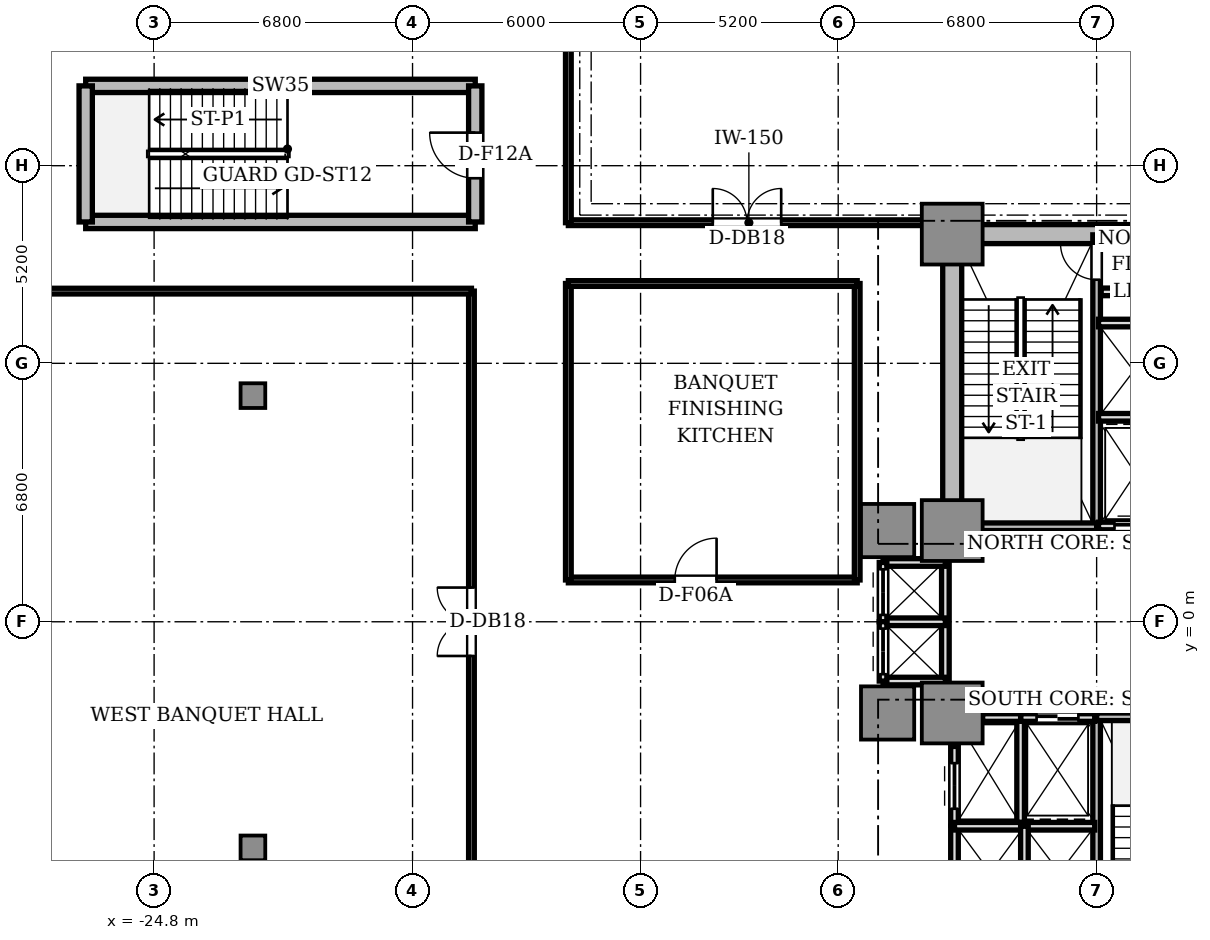
"""IFC4 building model, lengths in metres.
Left out: names, types, materials, properties, quantities, classifications, styles, units other than length and angle.
Written with IfcOpenShell. Run it as: python <this file> out.ifc"""

import sys

from ifc_helpers import new_model, si_unit, direction, frame, frame_2d, origin, origin_2d, place, context, subcontext, project, spatial, rectangle, hollow_rectangle, extrude, source, transform, mapped, element, fill, save


model = new_model("IFC4")
c1 = context("Model", 3, precision=1e-05, world=origin(), true_north=direction((0.0, 1.0)))
c2 = subcontext(c1, "Body", "Model", "MODEL_VIEW")
j1 = project(units=[si_unit("LENGTHUNIT", "METRE"), si_unit("PLANEANGLEUNIT", "RADIAN")], contexts=[c1])
p1 = place(None, origin())
s1 = spatial("IfcSite", under=j1, at=p1, CompositionType="ELEMENT")
p2 = place(p1, origin())
s2 = spatial("IfcBuilding", under=s1, at=p2, CompositionType="ELEMENT")
p3 = place(p2, frame((0.0, 0.0, 9.3)))
s3 = spatial("IfcBuildingStorey", under=s2, at=p3, CompositionType="ELEMENT", Elevation=9.3)
p4 = place(p3, frame((-3.55, 10.2, 0.0), z_axis=(0.0, 0.0, 1.0), x_axis=(1.0, 0.0, 0.0)))
e1 = element("IfcWall", 1, at=p4, inside=s3, PredefinedType="SHEAR", context=c2, shape_type="SweptSolid", body=[
    extrude(rectangle(XDim=7.1, YDim=0.5, at=frame_2d((3.55, 0.0))), origin(), (0.0, 0.0, 1.0), 4.4),
])
p5 = place(p3, frame((-3.8, 2.85, 0.0), z_axis=(0.0, 0.0, 1.0), x_axis=(0.0, 1.0, 0.0)))
e2 = element("IfcWall", 2, at=p5, inside=s3, PredefinedType="SHEAR", context=c2, shape_type="SweptSolid", body=[
    extrude(rectangle(XDim=6.9, YDim=0.5, at=frame_2d((3.45, 0.0))), origin(), (0.0, 0.0, 1.0), 4.4),
])
m1 = source(origin(), c2, "Body", "SweptSolid", [
    extrude(rectangle(XDim=1.6, YDim=1.6, at=origin_2d()), origin(), (0.0, 0.0, 1.0), 4.4),
])
for number, where, z_axis, x_axis in (
    (3, (-3.8, 2.4, 0.0), (0.0, 0.0, 1.0), (1.0, 0.0, 0.0)),
    (4, (-3.8, 10.2, 0.0), (0.0, 0.0, 1.0), (1.0, 0.0, 0.0)),
    (5, (-3.8, -2.4, 0.0), (0.0, 0.0, 1.0), (1.0, 0.0, 0.0)),
):
    element("IfcColumn", number, at=place(p3, frame(where, z_axis=z_axis, x_axis=x_axis)), inside=s3, PredefinedType="COLUMN", context=c2, shape_type="MappedRepresentation", body=[
        mapped(m1, transform((0.0, 0.0, 0.0), scale=1.0)),
    ])
m2 = source(origin(), c2, "Body", "SweptSolid", [
    extrude(rectangle(XDim=1.4, YDim=1.4, at=origin_2d()), origin(), (0.0, 0.0, 1.0), 4.4),
])
for number, where, z_axis, x_axis in (
    (6, (-5.5, 2.4, 0.0), (0.0, 0.0, 1.0), (1.0, 0.0, 0.0)),
    (7, (-5.5, -2.4, 0.0), (0.0, 0.0, 1.0), (1.0, 0.0, 0.0)),
):
    element("IfcColumn", number, at=place(p3, frame(where, z_axis=z_axis, x_axis=x_axis)), inside=s3, PredefinedType="COLUMN", context=c2, shape_type="MappedRepresentation", body=[
        mapped(m2, transform((0.0, 0.0, 0.0), scale=1.0)),
    ])
m3 = source(origin(), c2, "Body", "SweptSolid", [
    extrude(hollow_rectangle(XDim=0.65, YDim=0.65, WallThickness=0.032, at=origin_2d()), origin(), (0.0, 0.0, 1.0), 4.4),
])
for number, where, z_axis, x_axis in (
    (8, (-22.2, 5.95, 0.0), (0.0, 0.0, 1.0), (1.0, 0.0, 0.0)),
    (9, (-22.2, -5.95, 0.0), (0.0, 0.0, 1.0), (1.0, 0.0, 0.0)),
):
    element("IfcColumn", number, at=place(p3, frame(where, z_axis=z_axis, x_axis=x_axis)), inside=s3, PredefinedType="COLUMN", context=c2, shape_type="MappedRepresentation", body=[
        mapped(m3, transform((0.0, 0.0, 0.0), scale=1.0)),
    ])
p6 = place(p3, frame((0.0, 2.5, 0.0), z_axis=(0.0, 0.0, 1.0), x_axis=(0.0, 1.0, 0.0)))
e10 = element("IfcWall", 10, at=p6, inside=s3, PredefinedType="SOLIDWALL", context=c2, shape_type="SweptSolid", body=[
    extrude(rectangle(XDim=7.68, YDim=0.2, at=frame_2d((3.84, 0.0))), origin(), (0.0, 0.0, 1.0), 4.4),
])
p7 = place(p6, frame((6.5, 0.0, 0.0)))
e11 = element("IfcOpeningElement", 11, at=p7, cuts=e10, PredefinedType="OPENING", context=c2, shape_type="SweptSolid", body=[
    extrude(rectangle(XDim=0.95, YDim=2.15, at=frame_2d((0.475, 1.075))), frame((0.0, 0.11, 0.0), z_axis=(0.0, -1.0, 0.0), x_axis=(1.0, 0.0, 0.0)), (0.0, 0.0, 1.0), 0.22),
])
p8 = place(p3, frame((-3.72, 2.5, 0.0), z_axis=(0.0, 0.0, 1.0), x_axis=(1.0, 0.0, 0.0)))
e12 = element("IfcWall", 12, at=p8, inside=s3, PredefinedType="SOLIDWALL", context=c2, shape_type="SweptSolid", body=[
    extrude(rectangle(XDim=3.72, YDim=0.2, at=frame_2d((1.86, 0.0))), origin(), (0.0, 0.0, 1.0), 4.4),
])
p9 = place(p3, frame((0.0, -10.18, 0.0), z_axis=(0.0, 0.0, 1.0), x_axis=(0.0, 1.0, 0.0)))
e13 = element("IfcWall", 13, at=p9, inside=s3, PredefinedType="SOLIDWALL", context=c2, shape_type="SweptSolid", body=[
    extrude(rectangle(XDim=7.68, YDim=0.2, at=frame_2d((3.84, 0.0))), origin(), (0.0, 0.0, 1.0), 4.4),
])
p10 = place(p9, frame((0.28, 0.0, 0.0)))
e14 = element("IfcOpeningElement", 14, at=p10, cuts=e13, PredefinedType="OPENING", context=c2, shape_type="SweptSolid", body=[
    extrude(rectangle(XDim=1.1, YDim=2.15, at=frame_2d((0.55, 1.075))), frame((0.0, 0.11, 0.0), z_axis=(0.0, -1.0, 0.0), x_axis=(1.0, 0.0, 0.0)), (0.0, 0.0, 1.0), 0.22),
])
p11 = place(p3, frame((0.0, -2.5, 0.0), z_axis=(0.0, 0.0, 1.0), x_axis=(1.0, 0.0, 0.0)))
e15 = element("IfcWall", 15, at=p11, inside=s3, PredefinedType="SOLIDWALL", context=c2, shape_type="SweptSolid", body=[
    extrude(rectangle(XDim=3.72, YDim=0.2, at=frame_2d((1.86, 0.0))), origin(), (0.0, 0.0, 1.0), 4.4),
])
p12 = place(p3, frame((0.05, 2.52, 0.0), z_axis=(0.0, 0.0, 1.0), x_axis=(1.0, 0.0, 0.0)))
e16 = element("IfcWall", 16, at=p12, inside=s3, PredefinedType="SOLIDWALL", context=c2, shape_type="SweptSolid", body=[
    extrude(rectangle(XDim=1.95, YDim=0.2, at=frame_2d((0.975, 0.0))), origin(), (0.0, 0.0, 1.0), 3.95),
])
p13 = place(p12, frame((0.42, 0.0, 0.0)))
e17 = element("IfcOpeningElement", 17, at=p13, cuts=e16, PredefinedType="OPENING", context=c2, shape_type="SweptSolid", body=[
    extrude(rectangle(XDim=1.1, YDim=2.2, at=frame_2d((0.55, 1.1))), frame((0.0, 0.11, 0.0), z_axis=(0.0, -1.0, 0.0), x_axis=(1.0, 0.0, 0.0)), (0.0, 0.0, 1.0), 0.22),
])
p14 = place(p3, frame((-2.0, -5.28, 0.0), z_axis=(0.0, 0.0, 1.0), x_axis=(0.0, 1.0, 0.0)))
e18 = element("IfcWall", 18, at=p14, inside=s3, PredefinedType="SOLIDWALL", context=c2, shape_type="SweptSolid", body=[
    extrude(rectangle(XDim=2.78, YDim=0.2, at=frame_2d((1.39, 0.0))), origin(), (0.0, 0.0, 1.0), 3.95),
])
p15 = place(p3, frame((-2.0, -2.52, 0.0), z_axis=(0.0, 0.0, 1.0), x_axis=(1.0, 0.0, 0.0)))
e19 = element("IfcWall", 19, at=p15, inside=s3, PredefinedType="SOLIDWALL", context=c2, shape_type="SweptSolid", body=[
    extrude(rectangle(XDim=1.95, YDim=0.2, at=frame_2d((0.975, 0.0))), origin(), (0.0, 0.0, 1.0), 3.95),
])
p16 = place(p15, frame((0.42, 0.0, 0.0)))
e20 = element("IfcOpeningElement", 20, at=p16, cuts=e19, PredefinedType="OPENING", context=c2, shape_type="SweptSolid", body=[
    extrude(rectangle(XDim=1.1, YDim=2.2, at=frame_2d((0.55, 1.1))), frame((0.0, 0.11, 0.0), z_axis=(0.0, -1.0, 0.0), x_axis=(1.0, 0.0, 0.0)), (0.0, 0.0, 1.0), 0.22),
])
p17 = place(p3, frame((-3.0, -2.52, 0.0), z_axis=(0.0, 0.0, 1.0), x_axis=(1.0, 0.0, 0.0)))
e21 = element("IfcWall", 21, at=p17, inside=s3, PredefinedType="SOLIDWALL", context=c2, shape_type="SweptSolid", body=[
    extrude(rectangle(XDim=1.0, YDim=0.2, at=frame_2d((0.5, 0.0))), origin(), (0.0, 0.0, 1.0), 3.95),
])
p18 = place(p3, frame((-3.74, -5.36, 0.0), z_axis=(0.0, 0.0, 1.0), x_axis=(0.0, 1.0, 0.0)))
e22 = element("IfcWall", 22, at=p18, inside=s3, PredefinedType="SOLIDWALL", context=c2, shape_type="SweptSolid", body=[
    extrude(rectangle(XDim=2.08, YDim=0.2, at=frame_2d((1.04, 0.0))), origin(), (0.0, 0.0, 1.0), 3.95),
])
p19 = place(p18, frame((0.44, 0.0, 0.0)))
e23 = element("IfcOpeningElement", 23, at=p19, cuts=e22, PredefinedType="OPENING", context=c2, shape_type="SweptSolid", body=[
    extrude(rectangle(XDim=1.2, YDim=2.2, at=frame_2d((0.6, 1.1))), frame((0.0, 0.11, 0.0), z_axis=(0.0, -1.0, 0.0), x_axis=(1.0, 0.0, 0.0)), (0.0, 0.0, 1.0), 0.22),
])
p20 = place(p3, frame((0.05, 5.38, 0.0), z_axis=(0.0, 0.0, 1.0), x_axis=(1.0, 0.0, 0.0)))
e24 = element("IfcWall", 24, at=p20, inside=s3, PredefinedType="SOLIDWALL", context=c2, shape_type="SweptSolid", body=[
    extrude(rectangle(XDim=3.69, YDim=0.2, at=frame_2d((1.845, 0.0))), origin(), (0.0, 0.0, 1.0), 3.95),
])
p21 = place(p3, frame((0.05, 7.86, 0.0), z_axis=(0.0, 0.0, 1.0), x_axis=(1.0, 0.0, 0.0)))
e25 = element("IfcWall", 25, at=p21, inside=s3, PredefinedType="SOLIDWALL", context=c2, shape_type="SweptSolid", body=[
    extrude(rectangle(XDim=1.85, YDim=0.2, at=frame_2d((0.925, 0.0))), origin(), (0.0, 0.0, 1.0), 3.95),
])
p22 = place(p3, frame((-3.74, -7.86, 0.0), z_axis=(0.0, 0.0, 1.0), x_axis=(0.0, 1.0, 0.0)))
e26 = element("IfcWall", 26, at=p22, inside=s3, PredefinedType="SOLIDWALL", context=c2, shape_type="SweptSolid", body=[
    extrude(rectangle(XDim=2.48, YDim=0.2, at=frame_2d((1.24, 0.0))), origin(), (0.0, 0.0, 1.0), 3.95),
])
p23 = place(p3, frame((-3.74, -5.38, 0.0), z_axis=(0.0, 0.0, 1.0), x_axis=(1.0, 0.0, 0.0)))
e27 = element("IfcWall", 27, at=p23, inside=s3, PredefinedType="SOLIDWALL", context=c2, shape_type="SweptSolid", body=[
    extrude(rectangle(XDim=3.69, YDim=0.2, at=frame_2d((1.845, 0.0))), origin(), (0.0, 0.0, 1.0), 3.95),
])
p24 = place(p3, frame((-1.9, -7.86, 0.0), z_axis=(0.0, 0.0, 1.0), x_axis=(0.0, 1.0, 0.0)))
e28 = element("IfcWall", 28, at=p24, inside=s3, PredefinedType="SOLIDWALL", context=c2, shape_type="SweptSolid", body=[
    extrude(rectangle(XDim=2.48, YDim=0.2, at=frame_2d((1.24, 0.0))), origin(), (0.0, 0.0, 1.0), 3.95),
])
p25 = place(p3, frame((-3.98, -1.56, 0.0), z_axis=(0.0, 0.0, 1.0), x_axis=(0.0, 1.0, 0.0)))
e29 = element("IfcWall", 29, at=p25, inside=s3, PredefinedType="SOLIDWALL", context=c2, shape_type="SweptSolid", body=[
    extrude(rectangle(XDim=3.12, YDim=0.2, at=frame_2d((1.56, 0.0))), origin(), (0.0, 0.0, 1.0), 3.47),
])
for number, where, z_axis, x_axis in (
    (30, (-5.62, 1.56, 0.0), (0.0, 0.0, 1.0), (1.0, 0.0, 0.0)),
    (31, (-5.62, -1.56, 0.0), (0.0, 0.0, 1.0), (1.0, 0.0, 0.0)),
    (32, (-5.62, 0.0, 0.0), (0.0, 0.0, 1.0), (1.0, 0.0, 0.0)),
):
    element("IfcWall", number, at=place(p3, frame(where, z_axis=z_axis, x_axis=x_axis)), inside=s3, PredefinedType="SOLIDWALL", context=c2, shape_type="SweptSolid", body=[
        extrude(rectangle(XDim=1.64, YDim=0.2, at=frame_2d((0.82, 0.0))), origin(), (0.0, 0.0, 1.0), 3.95),
    ])
p26 = place(p3, frame((-5.62, 0.0, 0.0), z_axis=(0.0, 0.0, 1.0), x_axis=(0.0, 1.0, 0.0)))
e33 = element("IfcWall", 33, at=p26, inside=s3, PredefinedType="SOLIDWALL", context=c2, shape_type="SweptSolid", body=[
    extrude(rectangle(XDim=1.56, YDim=0.2, at=frame_2d((0.78, 0.0))), origin(), (0.0, 0.0, 1.0), 3.95),
])
p27 = place(p26, frame((0.18, 0.0, 0.0)))
e34 = element("IfcOpeningElement", 34, at=p27, cuts=e33, PredefinedType="OPENING", context=c2, shape_type="SweptSolid", body=[
    extrude(rectangle(XDim=1.2, YDim=2.2, at=frame_2d((0.6, 1.1))), frame((0.0, 0.11, 0.0), z_axis=(0.0, -1.0, 0.0), x_axis=(1.0, 0.0, 0.0)), (0.0, 0.0, 1.0), 0.22),
])
p28 = place(p3, frame((-5.62, -1.56, 0.0), z_axis=(0.0, 0.0, 1.0), x_axis=(0.0, 1.0, 0.0)))
e35 = element("IfcWall", 35, at=p28, inside=s3, PredefinedType="SOLIDWALL", context=c2, shape_type="SweptSolid", body=[
    extrude(rectangle(XDim=1.56, YDim=0.2, at=frame_2d((0.78, 0.0))), origin(), (0.0, 0.0, 1.0), 3.95),
])
p29 = place(p28, frame((0.18, 0.0, 0.0)))
e36 = element("IfcOpeningElement", 36, at=p29, cuts=e35, PredefinedType="OPENING", context=c2, shape_type="SweptSolid", body=[
    extrude(rectangle(XDim=1.2, YDim=2.2, at=frame_2d((0.6, 1.1))), frame((0.0, 0.11, 0.0), z_axis=(0.0, -1.0, 0.0), x_axis=(1.0, 0.0, 0.0)), (0.0, 0.0, 1.0), 0.22),
])
p30 = place(p3, frame((0.12, 8.68, 0.0), z_axis=(0.0, 0.0, 1.0), x_axis=(1.0, 0.0, 0.0)))
e37 = element("IfcWall", 37, at=p30, inside=s3, PredefinedType="SOLIDWALL", context=c2, shape_type="SweptSolid", body=[
    extrude(rectangle(XDim=3.62, YDim=0.2, at=frame_2d((1.81, 0.0))), origin(), (0.0, 0.0, 1.0), 3.95),
])
p31 = place(p30, frame((1.75, 0.0, 0.0)))
e38 = element("IfcOpeningElement", 38, at=p31, cuts=e37, PredefinedType="OPENING", context=c2, shape_type="SweptSolid", body=[
    extrude(rectangle(XDim=0.95, YDim=2.15, at=frame_2d((0.475, 1.075))), frame((0.0, 0.11, 0.0), z_axis=(0.0, -1.0, 0.0), x_axis=(1.0, 0.0, 0.0)), (0.0, 0.0, 1.0), 0.22),
])
for number, where, z_axis, x_axis in (
    (39, (-26.6, 14.1, 0.0), (0.0, 0.0, 1.0), (1.0, 0.0, 0.0)),
    (40, (-26.6, 10.52, 0.0), (0.0, 0.0, 1.0), (1.0, 0.0, 0.0)),
):
    element("IfcWall", number, at=place(p3, frame(where, z_axis=z_axis, x_axis=x_axis)), inside=s3, PredefinedType="SHEAR", context=c2, shape_type="SweptSolid", body=[
        extrude(rectangle(XDim=10.25, YDim=0.35, at=frame_2d((5.125, 0.0))), origin(), (0.0, 0.0, 1.0), 4.4),
    ])
p32 = place(p3, frame((-26.6, 10.52, 0.0), z_axis=(0.0, 0.0, 1.0), x_axis=(0.0, 1.0, 0.0)))
e41 = element("IfcWall", 41, at=p32, inside=s3, PredefinedType="SHEAR", context=c2, shape_type="SweptSolid", body=[
    extrude(rectangle(XDim=3.58, YDim=0.35, at=frame_2d((1.79, 0.0))), origin(), (0.0, 0.0, 1.0), 4.4),
])
p33 = place(p3, frame((-16.35, 10.52, 0.0), z_axis=(0.0, 0.0, 1.0), x_axis=(0.0, 1.0, 0.0)))
e42 = element("IfcWall", 42, at=p33, inside=s3, PredefinedType="SHEAR", context=c2, shape_type="SweptSolid", body=[
    extrude(rectangle(XDim=3.58, YDim=0.35, at=frame_2d((1.79, 0.0))), origin(), (0.0, 0.0, 1.0), 4.4),
])
p34 = place(p33, frame((1.15, 0.0, 0.0)))
e43 = element("IfcOpeningElement", 43, at=p34, cuts=e42, PredefinedType="OPENING", context=c2, shape_type="SweptSolid", body=[
    extrude(rectangle(XDim=1.2, YDim=2.2, at=frame_2d((0.6, 1.1))), frame((0.0, 0.185, 0.0), z_axis=(0.0, -1.0, 0.0), x_axis=(1.0, 0.0, 0.0)), (0.0, 0.0, 1.0), 0.37),
])
p35 = place(p3, frame((-13.9, 10.5, 0.0), z_axis=(0.0, 0.0, 1.0), x_axis=(1.0, 0.0, 0.0)))
e44 = element("IfcWall", 44, at=p35, inside=s3, PredefinedType="PARTITIONING", context=c2, shape_type="SweptSolid", body=[
    extrude(rectangle(XDim=9.5, YDim=0.15, at=frame_2d((4.75, 0.0))), origin(), (0.0, 0.0, 1.0), 3.95),
])
p36 = place(p35, frame((3.8, 0.0, 0.0)))
e45 = element("IfcOpeningElement", 45, at=p36, cuts=e44, PredefinedType="OPENING", context=c2, shape_type="SweptSolid", body=[
    extrude(rectangle(XDim=1.8, YDim=2.35, at=frame_2d((0.9, 1.175))), frame((0.0, 0.085, 0.0), z_axis=(0.0, -1.0, 0.0), x_axis=(1.0, 0.0, 0.0)), (0.0, 0.0, 1.0), 0.17),
])
p37 = place(p3, frame((-13.9, 10.5, 0.0), z_axis=(0.0, 0.0, 1.0), x_axis=(0.0, 1.0, 0.0)))
e46 = element("IfcWall", 46, at=p37, inside=s3, PredefinedType="PARTITIONING", context=c2, shape_type="SweptSolid", body=[
    extrude(rectangle(XDim=11.2, YDim=0.15, at=frame_2d((5.6, 0.0))), origin(), (0.0, 0.0, 1.0), 3.95),
])
p38 = place(p3, frame((-16.45, -8.7, 0.0), z_axis=(0.0, 0.0, 1.0), x_axis=(0.0, 1.0, 0.0)))
e47 = element("IfcWall", 47, at=p38, inside=s3, PredefinedType="PARTITIONING", context=c2, shape_type="SweptSolid", body=[
    extrude(rectangle(XDim=17.4, YDim=0.15, at=frame_2d((8.7, 0.0))), origin(), (0.0, 0.0, 1.0), 3.95),
])
p39 = place(p38, frame((7.8, 0.0, 0.0)))
e48 = element("IfcOpeningElement", 48, at=p39, cuts=e47, PredefinedType="OPENING", context=c2, shape_type="SweptSolid", body=[
    extrude(rectangle(XDim=1.8, YDim=2.35, at=frame_2d((0.9, 1.175))), frame((0.0, 0.085, 0.0), z_axis=(0.0, -1.0, 0.0), x_axis=(1.0, 0.0, 0.0)), (0.0, 0.0, 1.0), 0.17),
])
p40 = place(p3, frame((-29.6, 8.7, 0.0), z_axis=(0.0, 0.0, 1.0), x_axis=(1.0, 0.0, 0.0)))
e49 = element("IfcWall", 49, at=p40, inside=s3, PredefinedType="PARTITIONING", context=c2, shape_type="SweptSolid", body=[
    extrude(rectangle(XDim=13.15, YDim=0.15, at=frame_2d((6.575, 0.0))), origin(), (0.0, 0.0, 1.0), 3.95),
])
p41 = place(p3, frame((-13.9, 1.1, 0.0), z_axis=(0.0, 0.0, 1.0), x_axis=(1.0, 0.0, 0.0)))
e50 = element("IfcWall", 50, at=p41, inside=s3, PredefinedType="PARTITIONING", context=c2, shape_type="SweptSolid", body=[
    extrude(rectangle(XDim=7.6, YDim=0.15, at=frame_2d((3.8, 0.0))), origin(), (0.0, 0.0, 1.0), 3.95),
])
p42 = place(p41, frame((2.8, 0.0, 0.0)))
e51 = element("IfcOpeningElement", 51, at=p42, cuts=e50, PredefinedType="OPENING", context=c2, shape_type="SweptSolid", body=[
    extrude(rectangle(XDim=1.1, YDim=2.15, at=frame_2d((0.55, 1.075))), frame((0.0, 0.085, 0.0), z_axis=(0.0, -1.0, 0.0), x_axis=(1.0, 0.0, 0.0)), (0.0, 0.0, 1.0), 0.17),
])
for number, where, z_axis, x_axis in (
    (52, (-13.9, 1.1, 0.0), (0.0, 0.0, 1.0), (0.0, 1.0, 0.0)),
    (53, (-6.3, 1.1, 0.0), (0.0, 0.0, 1.0), (0.0, 1.0, 0.0)),
):
    element("IfcWall", number, at=place(p3, frame(where, z_axis=z_axis, x_axis=x_axis)), inside=s3, PredefinedType="PARTITIONING", context=c2, shape_type="SweptSolid", body=[
        extrude(rectangle(XDim=7.8, YDim=0.15, at=frame_2d((3.9, 0.0))), origin(), (0.0, 0.0, 1.0), 3.95),
    ])
p43 = place(p3, frame((-13.9, 8.9, 0.0), z_axis=(0.0, 0.0, 1.0), x_axis=(1.0, 0.0, 0.0)))
e54 = element("IfcWall", 54, at=p43, inside=s3, PredefinedType="PARTITIONING", context=c2, shape_type="SweptSolid", body=[
    extrude(rectangle(XDim=7.6, YDim=0.15, at=frame_2d((3.8, 0.0))), origin(), (0.0, 0.0, 1.0), 3.95),
])
m4 = source(origin(), c2, "Body", "SweptSolid", [
    extrude(rectangle(XDim=1.1, YDim=0.05, at=origin_2d()), origin(), (0.0, 0.0, 1.0), 2.2),
])
p44 = place(p13, frame((0.55, 0.0, 0.0)))
e55 = element("IfcDoor", 55, at=p44, inside=s3, OperationType="DOUBLE_DOOR_SLIDING", PredefinedType="DOOR", context=c2, shape_type="MappedRepresentation", body=[
    mapped(m4, transform((0.0, 0.0, 0.0), scale=1.0)),
])
fill(e17, e55)
p45 = place(p16, frame((0.55, 0.0, 0.0)))
e56 = element("IfcDoor", 56, at=p45, inside=s3, OperationType="DOUBLE_DOOR_SLIDING", PredefinedType="DOOR", context=c2, shape_type="MappedRepresentation", body=[
    mapped(m4, transform((0.0, 0.0, 0.0), scale=1.0)),
])
fill(e20, e56)
m5 = source(origin(), c2, "Body", "SweptSolid", [
    extrude(rectangle(XDim=1.2, YDim=0.05, at=origin_2d()), origin(), (0.0, 0.0, 1.0), 2.2),
])
p46 = place(p19, frame((0.6, 0.0, 0.0)))
e57 = element("IfcDoor", 57, at=p46, inside=s3, OperationType="DOUBLE_DOOR_SLIDING", PredefinedType="DOOR", context=c2, shape_type="MappedRepresentation", body=[
    mapped(m5, transform((0.0, 0.0, 0.0), scale=1.0)),
])
fill(e23, e57)
p47 = place(p27, frame((0.6, 0.0, 0.0)))
e58 = element("IfcDoor", 58, at=p47, inside=s3, OperationType="DOUBLE_DOOR_SLIDING", PredefinedType="DOOR", context=c2, shape_type="MappedRepresentation", body=[
    mapped(m5, transform((0.0, 0.0, 0.0), scale=1.0)),
])
fill(e34, e58)
p48 = place(p29, frame((0.6, 0.0, 0.0)))
e59 = element("IfcDoor", 59, at=p48, inside=s3, OperationType="DOUBLE_DOOR_SLIDING", PredefinedType="DOOR", context=c2, shape_type="MappedRepresentation", body=[
    mapped(m5, transform((0.0, 0.0, 0.0), scale=1.0)),
])
fill(e36, e59)
m6 = source(origin(), c2, "Body", "SweptSolid", [
    extrude(rectangle(XDim=0.95, YDim=0.05, at=origin_2d()), origin(), (0.0, 0.0, 1.0), 2.15),
])
p49 = place(p7, frame((0.475, 0.0, 0.0)))
e60 = element("IfcDoor", 60, at=p49, inside=s3, OperationType="SINGLE_SWING_RIGHT", PredefinedType="DOOR", context=c2, shape_type="MappedRepresentation", body=[
    mapped(m6, transform((0.0, 0.0, 0.0), scale=1.0)),
])
fill(e11, e60)
p50 = place(p34, frame((0.6, 0.0, 0.0)))
e61 = element("IfcDoor", 61, at=p50, inside=s3, OperationType="SINGLE_SWING_RIGHT", PredefinedType="DOOR", context=c2, shape_type="MappedRepresentation", body=[
    mapped(m5, transform((0.0, 0.0, 0.0), scale=1.0)),
])
fill(e43, e61)
m7 = source(origin(), c2, "Body", "SweptSolid", [
    extrude(rectangle(XDim=1.8, YDim=0.05, at=origin_2d()), origin(), (0.0, 0.0, 1.0), 2.35),
])
p51 = place(p36, frame((0.9, 0.0, 0.0)))
e62 = element("IfcDoor", 62, at=p51, inside=s3, OperationType="DOUBLE_DOOR_SINGLE_SWING", PredefinedType="DOOR", context=c2, shape_type="MappedRepresentation", body=[
    mapped(m7, transform((0.0, 0.0, 0.0), scale=1.0)),
])
fill(e45, e62)
p52 = place(p39, frame((0.9, 0.0, 0.0)))
e63 = element("IfcDoor", 63, at=p52, inside=s3, OperationType="DOUBLE_DOOR_SINGLE_SWING", PredefinedType="DOOR", context=c2, shape_type="MappedRepresentation", body=[
    mapped(m7, transform((0.0, 0.0, 0.0), scale=1.0)),
])
fill(e48, e63)
m8 = source(origin(), c2, "Body", "SweptSolid", [
    extrude(rectangle(XDim=1.1, YDim=0.05, at=origin_2d()), origin(), (0.0, 0.0, 1.0), 2.15),
])
p53 = place(p42, frame((0.55, 0.0, 0.0)))
e64 = element("IfcDoor", 64, at=p53, inside=s3, OperationType="SINGLE_SWING_RIGHT", PredefinedType="DOOR", context=c2, shape_type="MappedRepresentation", body=[
    mapped(m8, transform((0.0, 0.0, 0.0), scale=1.0)),
])
fill(e51, e64)
save(model, sys.argv[1])
